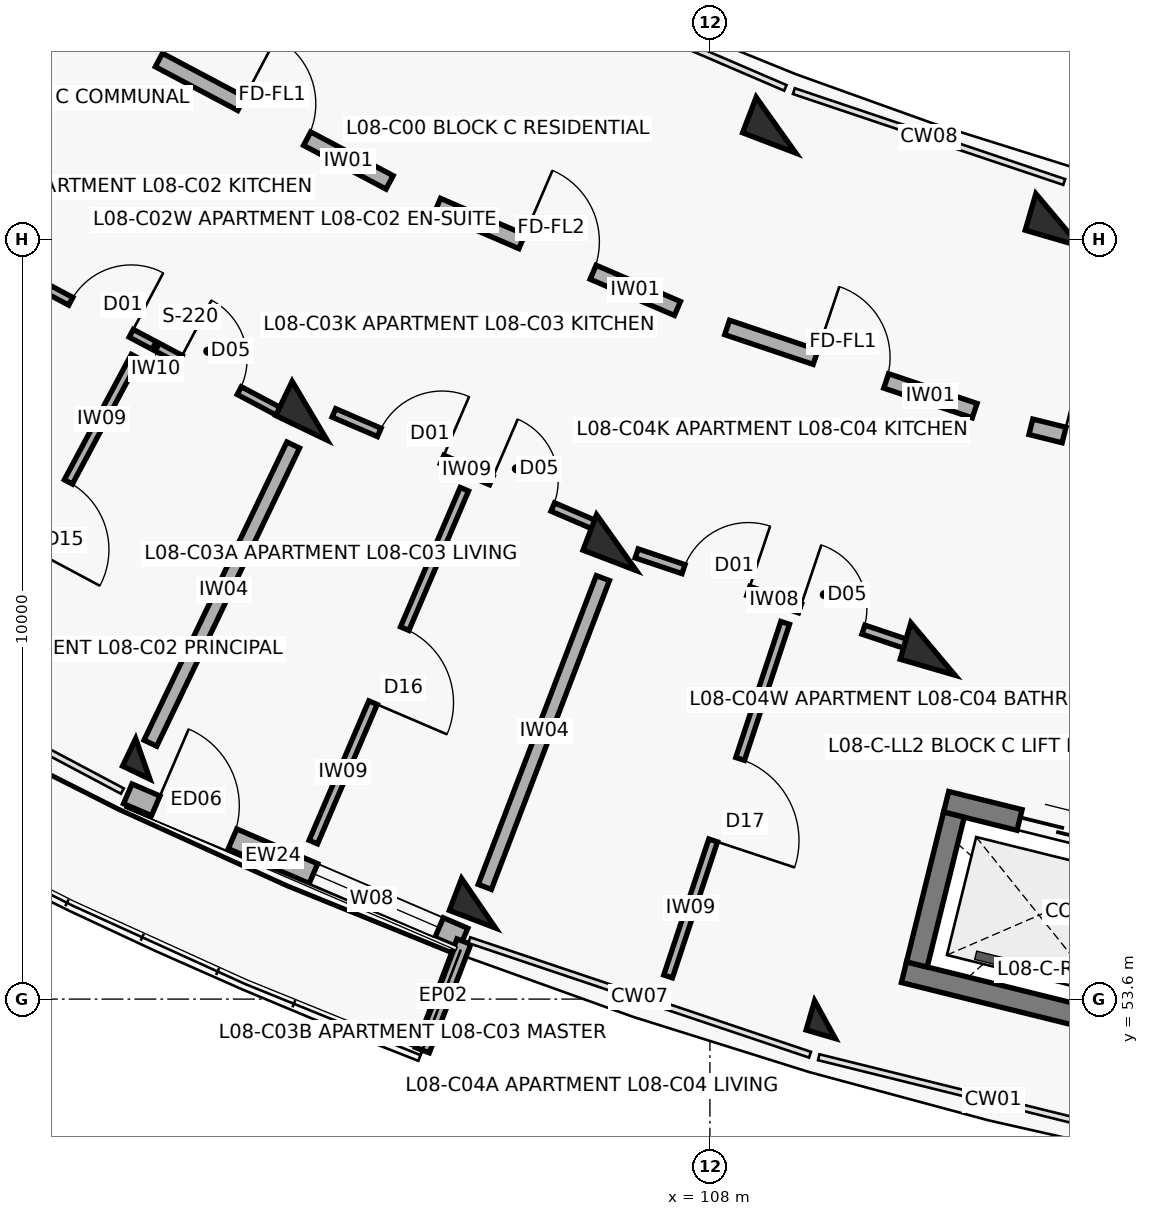
"""IFC4 building model, lengths in metres.
Left out: names, types, materials, properties, quantities, classifications, styles, units other than length and angle.
Written with IfcOpenShell. Run it as: python <this file> out.ifc"""

import sys

from ifc_helpers import new_model, si_unit, direction, frame, frame_2d, origin, origin_2d, place, context, subcontext, project, spatial, rectangle, extrude, element, fill, save


model = new_model("IFC4")
c1 = context("Model", 3, precision=1e-05, world=origin(), true_north=direction((0.0, 1.0)))
c2 = subcontext(c1, "Body", "Model", "MODEL_VIEW")
j1 = project(units=[si_unit("LENGTHUNIT", "METRE"), si_unit("PLANEANGLEUNIT", "RADIAN")], contexts=[c1])
p1 = place(None, origin())
s1 = spatial("IfcSite", under=j1, at=p1, CompositionType="ELEMENT")
p2 = place(p1, origin())
s2 = spatial("IfcBuilding", under=s1, at=p2, CompositionType="ELEMENT")
p3 = place(p2, frame((0.0, 0.0, 26.7)))
s3 = spatial("IfcBuildingStorey", under=s2, at=p3, CompositionType="ELEMENT", Elevation=26.7)
p4 = place(p3, frame((102.734, 61.341, 0.0), z_axis=(0.0, 0.0, 1.0), x_axis=(-0.432085748802, -0.901832526405, 0.0)))
e1 = element("IfcColumn", 1, at=p4, inside=s3, PredefinedType="COLUMN", context=c2, shape_type="SweptSolid", body=[
    extrude(rectangle(XDim=0.5, YDim=0.75, at=origin_2d()), origin(), (0.0, 0.0, 1.0), 3.1),
])
p5 = place(p3, frame((100.539, 56.76, 0.0), z_axis=(0.0, 0.0, 1.0), x_axis=(-0.432085748802, -0.901832526405, 0.0)))
e2 = element("IfcColumn", 2, at=p5, inside=s3, PredefinedType="COLUMN", context=c2, shape_type="SweptSolid", body=[
    extrude(rectangle(XDim=0.4, YDim=0.4, at=origin_2d()), origin(), (0.0, 0.0, 1.0), 3.1),
])
for number, where, z_axis, x_axis in (
    (3, (108.869, 65.099, 0.0), (0.0, 0.0, 1.0), (-0.357, -0.934, 0.0)),
    (4, (106.77, 59.606, 0.0), (0.0, 0.0, 1.0), (-0.357, -0.934, 0.0)),
):
    element("IfcColumn", number, at=place(p3, frame(where, z_axis=z_axis, x_axis=x_axis)), inside=s3, PredefinedType="COLUMN", context=c2, shape_type="SweptSolid", body=[
        extrude(rectangle(XDim=0.5, YDim=0.75, at=origin_2d()), origin(), (0.0, 0.0, 1.0), 3.1),
    ])
p6 = place(p3, frame((104.956, 54.861, 0.0), z_axis=(0.0, 0.0, 1.0), x_axis=(-0.357064076459, -0.934079892355, 0.0)))
e5 = element("IfcColumn", 5, at=p6, inside=s3, PredefinedType="COLUMN", context=c2, shape_type="SweptSolid", body=[
    extrude(rectangle(XDim=0.45, YDim=0.65, at=origin_2d()), origin(), (0.0, 0.0, 1.0), 3.1),
])
for number, where, z_axis, x_axis in (
    (6, (112.579, 63.852, 0.0), (0.0, 0.0, 1.0), (-0.28, -0.96, 0.0)),
    (7, (110.934, 58.207, 0.0), (0.0, 0.0, 1.0), (-0.28, -0.96, 0.0)),
):
    element("IfcColumn", number, at=place(p3, frame(where, z_axis=z_axis, x_axis=x_axis)), inside=s3, PredefinedType="COLUMN", context=c2, shape_type="SweptSolid", body=[
        extrude(rectangle(XDim=0.5, YDim=0.75, at=origin_2d()), origin(), (0.0, 0.0, 1.0), 3.1),
    ])
p7 = place(p3, frame((109.513, 53.329, 0.0), z_axis=(0.0, 0.0, 1.0), x_axis=(-0.27966144946, -0.96009867914, 0.0)))
e8 = element("IfcColumn", 8, at=p7, inside=s3, PredefinedType="COLUMN", context=c2, shape_type="SweptSolid", body=[
    extrude(rectangle(XDim=0.4, YDim=0.4, at=origin_2d()), origin(), (0.0, 0.0, 1.0), 3.1),
])
p8 = place(p3, frame((100.341, 56.301, 0.0), z_axis=(0.0, 0.0, 1.0), x_axis=(0.918737524932, -0.39486878869, 0.0)))
e9 = element("IfcWall", 9, at=p8, inside=s3, PredefinedType="SOLIDWALL", context=c2, shape_type="SweptSolid", body=[
    extrude(rectangle(XDim=4.809, YDim=0.282, at=frame_2d((2.405, 0.0))), origin(), (0.0, 0.0, 1.0), 2.25),
])
p9 = place(p8, frame((0.4, 0.0, 0.0)))
e10 = element("IfcOpeningElement", 10, at=p9, cuts=e9, PredefinedType="OPENING", context=c2, shape_type="SweptSolid", body=[
    extrude(rectangle(XDim=1.1, YDim=2.15, at=frame_2d((0.55, 1.075))), frame((0.0, 0.151, 0.0), z_axis=(0.0, -1.0, 0.0), x_axis=(1.0, 0.0, 0.0)), (0.0, 0.0, 1.0), 0.302),
])
p10 = place(p8, frame((2.659, 0.0, 0.35)))
e11 = element("IfcOpeningElement", 11, at=p10, cuts=e9, PredefinedType="OPENING", context=c2, shape_type="SweptSolid", body=[
    extrude(rectangle(XDim=1.8, YDim=1.65, at=frame_2d((0.9, 0.825))), frame((0.0, 0.151, 0.0), z_axis=(0.0, -1.0, 0.0), x_axis=(1.0, 0.0, 0.0)), (0.0, 0.0, 1.0), 0.302),
])
p11 = place(p3, frame((104.763, 54.357, 0.0), z_axis=(0.0, 0.0, 1.0), x_axis=(-0.356957296461, -0.934120703391, 0.0)))
e12 = element("IfcWall", 12, at=p11, inside=s3, PredefinedType="PARAPET", context=c2, shape_type="SweptSolid", body=[
    extrude(rectangle(XDim=1.53, YDim=0.195, at=frame_2d((0.765, 0.0))), origin(), (0.0, 0.0, 1.0), 2.25),
])
p12 = place(p3, frame((111.108, 56.196, 0.0), z_axis=(0.0, 0.0, 1.0), x_axis=(0.970706856107, -0.240266933861, 0.0)))
e13 = element("IfcWall", 13, at=p12, inside=s3, PredefinedType="SHEAR", context=c2, shape_type="SweptSolid", body=[
    extrude(rectangle(XDim=3.09, YDim=0.28, at=frame_2d((1.545, 0.0))), origin(), (0.0, 0.0, 1.0), 3.1),
])
p13 = place(p12, frame((0.995, 0.0, 0.0)))
e14 = element("IfcOpeningElement", 14, at=p13, cuts=e13, PredefinedType="OPENING", context=c2, shape_type="SweptSolid", body=[
    extrude(rectangle(XDim=1.1, YDim=2.15, at=frame_2d((0.55, 1.075))), frame((0.0, 0.15, 0.0), z_axis=(0.0, -1.0, 0.0), x_axis=(1.0, 0.0, 0.0)), (0.0, 0.0, 1.0), 0.3),
])
p14 = place(p3, frame((110.553, 53.954, 0.0), z_axis=(0.0, 0.0, 1.0), x_axis=(0.970725280816, -0.240192483614, 0.0)))
e15 = element("IfcWall", 15, at=p14, inside=s3, PredefinedType="SHEAR", context=c2, shape_type="SweptSolid", body=[
    extrude(rectangle(XDim=3.09, YDim=0.28, at=frame_2d((1.545, 0.0))), origin(), (0.0, 0.0, 1.0), 3.1),
])
p15 = place(p3, frame((111.21, 56.027, 0.0), z_axis=(0.0, 0.0, 1.0), x_axis=(-0.240186044774, -0.970726873995, 0.0)))
e16 = element("IfcWall", 16, at=p15, inside=s3, PredefinedType="SHEAR", context=c2, shape_type="SweptSolid", body=[
    extrude(rectangle(XDim=2.03, YDim=0.28, at=frame_2d((1.015, 0.0))), origin(), (0.0, 0.0, 1.0), 3.1),
])
p16 = place(p3, frame((100.75, 65.956, 0.0), z_axis=(0.0, 0.0, 1.0), x_axis=(0.883440266101, -0.468543803963, 0.0)))
e17 = element("IfcWall", 17, at=p16, inside=s3, PredefinedType="SOLIDWALL", context=c2, shape_type="SweptSolid", body=[
    extrude(rectangle(XDim=3.436, YDim=0.2, at=frame_2d((1.718, 0.0))), origin(), (0.0, 0.0, 1.0), 2.08),
])
p17 = place(p16, frame((1.228, 0.0, 0.0)))
e18 = element("IfcOpeningElement", 18, at=p17, cuts=e17, PredefinedType="OPENING", context=c2, shape_type="SweptSolid", body=[
    extrude(rectangle(XDim=0.98, YDim=2.15, at=frame_2d((0.49, 1.075))), frame((0.0, 0.11, 0.0), z_axis=(0.0, -1.0, 0.0), x_axis=(1.0, 0.0, 0.0)), (0.0, 0.0, 1.0), 0.22),
])
p18 = place(p3, frame((99.017, 63.087, 0.0), z_axis=(0.0, 0.0, 1.0), x_axis=(0.883415075746, -0.468591297342, 0.0)))
e19 = element("IfcWall", 19, at=p18, inside=s3, PredefinedType="PARTITIONING", context=c2, shape_type="SweptSolid", body=[
    extrude(rectangle(XDim=3.81, YDim=0.115, at=frame_2d((1.905, 0.0))), origin(), (0.0, 0.0, 1.0), 2.08),
])
p19 = place(p18, frame((0.65, 0.0, 0.0)))
e20 = element("IfcOpeningElement", 20, at=p19, cuts=e19, PredefinedType="OPENING", context=c2, shape_type="SweptSolid", body=[
    extrude(rectangle(XDim=0.9, YDim=2.1, at=frame_2d((0.45, 1.05))), frame((0.0, 0.067, 0.0), z_axis=(0.0, -1.0, 0.0), x_axis=(1.0, 0.0, 0.0)), (0.0, 0.0, 1.0), 0.135),
])
p20 = place(p18, frame((2.28, 0.0, 0.0)))
e21 = element("IfcOpeningElement", 21, at=p20, cuts=e19, PredefinedType="OPENING", context=c2, shape_type="SweptSolid", body=[
    extrude(rectangle(XDim=0.88, YDim=2.1, at=frame_2d((0.44, 1.05))), frame((0.0, 0.067, 0.0), z_axis=(0.0, -1.0, 0.0), x_axis=(1.0, 0.0, 0.0)), (0.0, 0.0, 1.0), 0.135),
])
p21 = place(p3, frame((100.44, 62.054, 0.0), z_axis=(0.0, 0.0, 1.0), x_axis=(-0.471207016772, -0.882022645596, 0.0)))
e22 = element("IfcWall", 22, at=p21, inside=s3, PredefinedType="PARTITIONING", context=c2, shape_type="SweptSolid", body=[
    extrude(rectangle(XDim=4.75, YDim=0.12, at=frame_2d((2.375, 0.0))), origin(), (0.0, 0.0, 1.0), 2.08),
])
p22 = place(p21, frame((1.87, 0.0, 0.0)))
e23 = element("IfcOpeningElement", 23, at=p22, cuts=e22, PredefinedType="OPENING", context=c2, shape_type="SweptSolid", body=[
    extrude(rectangle(XDim=1.01, YDim=2.1, at=frame_2d((0.505, 1.05))), frame((0.0, 0.07, 0.0), z_axis=(0.0, -1.0, 0.0), x_axis=(1.0, 0.0, 0.0)), (0.0, 0.0, 1.0), 0.14),
])
p23 = place(p3, frame((104.417, 64.044, 0.0), z_axis=(0.0, 0.0, 1.0), x_axis=(0.918718172399, -0.394913813008, 0.0)))
e24 = element("IfcWall", 24, at=p23, inside=s3, PredefinedType="SOLIDWALL", context=c2, shape_type="SweptSolid", body=[
    extrude(rectangle(XDim=3.436, YDim=0.2, at=frame_2d((1.718, 0.0))), origin(), (0.0, 0.0, 1.0), 2.08),
])
p24 = place(p23, frame((1.208, 0.0, 0.0)))
e25 = element("IfcOpeningElement", 25, at=p24, cuts=e24, PredefinedType="OPENING", context=c2, shape_type="SweptSolid", body=[
    extrude(rectangle(XDim=1.02, YDim=2.15, at=frame_2d((0.51, 1.075))), frame((0.0, 0.11, 0.0), z_axis=(0.0, -1.0, 0.0), x_axis=(1.0, 0.0, 0.0)), (0.0, 0.0, 1.0), 0.22),
])
p25 = place(p3, frame((103.052, 61.313, 0.0), z_axis=(0.0, 0.0, 1.0), x_axis=(0.918714121981, -0.39492323567, 0.0)))
e26 = element("IfcWall", 26, at=p25, inside=s3, PredefinedType="PARTITIONING", context=c2, shape_type="SweptSolid", body=[
    extrude(rectangle(XDim=3.785, YDim=0.12, at=frame_2d((1.893, 0.0))), origin(), (0.0, 0.0, 1.0), 2.08),
])
p26 = place(p25, frame((0.65, 0.0, 0.0)))
e27 = element("IfcOpeningElement", 27, at=p26, cuts=e26, PredefinedType="OPENING", context=c2, shape_type="SweptSolid", body=[
    extrude(rectangle(XDim=0.9, YDim=2.1, at=frame_2d((0.45, 1.05))), frame((0.0, 0.07, 0.0), z_axis=(0.0, -1.0, 0.0), x_axis=(1.0, 0.0, 0.0)), (0.0, 0.0, 1.0), 0.14),
])
p27 = place(p25, frame((2.255, 0.0, 0.0)))
e28 = element("IfcOpeningElement", 28, at=p27, cuts=e26, PredefinedType="OPENING", context=c2, shape_type="SweptSolid", body=[
    extrude(rectangle(XDim=0.88, YDim=2.1, at=frame_2d((0.44, 1.05))), frame((0.0, 0.07, 0.0), z_axis=(0.0, -1.0, 0.0), x_axis=(1.0, 0.0, 0.0)), (0.0, 0.0, 1.0), 0.14),
])
p28 = place(p3, frame((104.769, 60.309, 0.0), z_axis=(0.0, 0.0, 1.0), x_axis=(-0.393522505308, -0.919314982917, 0.0)))
e29 = element("IfcWall", 29, at=p28, inside=s3, PredefinedType="PARTITIONING", context=c2, shape_type="SweptSolid", body=[
    extrude(rectangle(XDim=5.05, YDim=0.12, at=frame_2d((2.525, 0.0))), origin(), (0.0, 0.0, 1.0), 2.08),
])
p29 = place(p28, frame((1.995, 0.0, 0.0)))
e30 = element("IfcOpeningElement", 30, at=p29, cuts=e29, PredefinedType="OPENING", context=c2, shape_type="SweptSolid", body=[
    extrude(rectangle(XDim=1.06, YDim=2.1, at=frame_2d((0.53, 1.05))), frame((0.0, 0.07, 0.0), z_axis=(0.0, -1.0, 0.0), x_axis=(1.0, 0.0, 0.0)), (0.0, 0.0, 1.0), 0.14),
])
p30 = place(p3, frame((102.518, 60.89, 0.0), z_axis=(0.0, 0.0, 1.0), x_axis=(-0.432108769108, -0.901821496561, 0.0)))
e31 = element("IfcWall", 31, at=p30, inside=s3, PredefinedType="SOLIDWALL", context=c2, shape_type="SweptSolid", body=[
    extrude(rectangle(XDim=4.35, YDim=0.185, at=frame_2d((2.175, 0.0))), origin(), (0.0, 0.0, 1.0), 2.08),
])
p31 = place(p3, frame((108.227, 62.437, 0.0), z_axis=(0.0, 0.0, 1.0), x_axis=(0.947884468821, -0.318614239745, 0.0)))
e32 = element("IfcWall", 32, at=p31, inside=s3, PredefinedType="SOLIDWALL", context=c2, shape_type="SweptSolid", body=[
    extrude(rectangle(XDim=3.436, YDim=0.2, at=frame_2d((1.718, 0.0))), origin(), (0.0, 0.0, 1.0), 2.08),
])
p32 = place(p31, frame((1.228, 0.0, 0.0)))
e33 = element("IfcOpeningElement", 33, at=p32, cuts=e32, PredefinedType="OPENING", context=c2, shape_type="SweptSolid", body=[
    extrude(rectangle(XDim=0.98, YDim=2.15, at=frame_2d((0.49, 1.075))), frame((0.0, 0.11, 0.0), z_axis=(0.0, -1.0, 0.0), x_axis=(1.0, 0.0, 0.0)), (0.0, 0.0, 1.0), 0.22),
])
p33 = place(p3, frame((107.036, 59.464, 0.0), z_axis=(0.0, 0.0, 1.0), x_axis=(0.947883094845, -0.318618327323, 0.0)))
e34 = element("IfcWall", 34, at=p33, inside=s3, PredefinedType="PARTITIONING", context=c2, shape_type="SweptSolid", body=[
    extrude(rectangle(XDim=3.798, YDim=0.125, at=frame_2d((1.899, 0.0))), origin(), (0.0, 0.0, 1.0), 2.08),
])
p34 = place(p33, frame((0.65, 0.0, 0.0)))
e35 = element("IfcOpeningElement", 35, at=p34, cuts=e34, PredefinedType="OPENING", context=c2, shape_type="SweptSolid", body=[
    extrude(rectangle(XDim=0.9, YDim=2.1, at=frame_2d((0.45, 1.05))), frame((0.0, 0.073, 0.0), z_axis=(0.0, -1.0, 0.0), x_axis=(1.0, 0.0, 0.0)), (0.0, 0.0, 1.0), 0.145),
])
p35 = place(p33, frame((2.267, 0.0, 0.0)))
e36 = element("IfcOpeningElement", 36, at=p35, cuts=e34, PredefinedType="OPENING", context=c2, shape_type="SweptSolid", body=[
    extrude(rectangle(XDim=0.88, YDim=2.1, at=frame_2d((0.44, 1.05))), frame((0.0, 0.073, 0.0), z_axis=(0.0, -1.0, 0.0), x_axis=(1.0, 0.0, 0.0)), (0.0, 0.0, 1.0), 0.145),
])
p36 = place(p3, frame((108.99, 58.55, 0.0), z_axis=(0.0, 0.0, 1.0), x_axis=(-0.314343770763, -0.949309219266, 0.0)))
e37 = element("IfcWall", 37, at=p36, inside=s3, PredefinedType="PARTITIONING", context=c2, shape_type="SweptSolid", body=[
    extrude(rectangle(XDim=4.9, YDim=0.12, at=frame_2d((2.45, 0.0))), origin(), (0.0, 0.0, 1.0), 2.08),
])
p37 = place(p36, frame((1.885, 0.0, 0.0)))
e38 = element("IfcOpeningElement", 38, at=p37, cuts=e37, PredefinedType="OPENING", context=c2, shape_type="SweptSolid", body=[
    extrude(rectangle(XDim=1.13, YDim=2.1, at=frame_2d((0.565, 1.05))), frame((0.0, 0.07, 0.0), z_axis=(0.0, -1.0, 0.0), x_axis=(1.0, 0.0, 0.0)), (0.0, 0.0, 1.0), 0.14),
])
p38 = place(p3, frame((106.591, 59.139, 0.0), z_axis=(0.0, 0.0, 1.0), x_axis=(-0.357064016205, -0.934079915388, 0.0)))
e39 = element("IfcWall", 39, at=p38, inside=s3, PredefinedType="SOLIDWALL", context=c2, shape_type="SweptSolid", body=[
    extrude(rectangle(XDim=4.35, YDim=0.185, at=frame_2d((2.175, 0.0))), origin(), (0.0, 0.0, 1.0), 2.08),
])
p39 = place(p3, frame((112.223, 61.13, 0.0), z_axis=(0.0, 0.0, 1.0), x_axis=(0.970719238682, -0.240216901263, 0.0)))
e40 = element("IfcWall", 40, at=p39, inside=s3, PredefinedType="SOLIDWALL", context=c2, shape_type="SweptSolid", body=[
    extrude(rectangle(XDim=3.296, YDim=0.21, at=frame_2d((1.648, 0.0))), origin(), (0.0, 0.0, 1.0), 2.08),
])
p40 = place(p39, frame((0.45, 0.0, 0.0)))
e41 = element("IfcOpeningElement", 41, at=p40, cuts=e40, PredefinedType="OPENING", context=c2, shape_type="SweptSolid", body=[
    extrude(rectangle(XDim=1.1, YDim=2.15, at=frame_2d((0.55, 1.075))), frame((0.0, 0.115, 0.0), z_axis=(0.0, -1.0, 0.0), x_axis=(1.0, 0.0, 0.0)), (0.0, 0.0, 1.0), 0.23),
])
p41 = place(p39, frame((1.726, 0.0, 0.0)))
e42 = element("IfcOpeningElement", 42, at=p41, cuts=e40, PredefinedType="OPENING", context=c2, shape_type="SweptSolid", body=[
    extrude(rectangle(XDim=1.12, YDim=2.15, at=frame_2d((0.56, 1.075))), frame((0.0, 0.115, 0.0), z_axis=(0.0, -1.0, 0.0), x_axis=(1.0, 0.0, 0.0)), (0.0, 0.0, 1.0), 0.23),
])
p42 = place(p9, origin())
e43 = element("IfcDoor", 43, at=p42, inside=s3, OperationType="SINGLE_SWING_LEFT", PredefinedType="DOOR", context=c2, shape_type="SweptSolid", body=[
    extrude(rectangle(XDim=1.1, YDim=2.15, at=frame_2d((0.55, 1.075))), frame((0.0, 0.025, 0.0), z_axis=(0.0, -1.0, 0.0), x_axis=(1.0, 0.0, 0.0)), (0.0, 0.0, 1.0), 0.05),
])
fill(e10, e43)
p43 = place(p10, origin())
e44 = element("IfcWindow", 44, at=p43, inside=s3, PartitioningType="TRIPLE_PANEL_VERTICAL", PredefinedType="WINDOW", context=c2, shape_type="SweptSolid", body=[
    extrude(rectangle(XDim=1.8, YDim=1.65, at=frame_2d((0.9, 0.825))), frame((0.0, 0.03, 0.0), z_axis=(0.0, -1.0, 0.0), x_axis=(1.0, 0.0, 0.0)), (0.0, 0.0, 1.0), 0.06),
])
fill(e11, e44)
p44 = place(p13, origin())
e45 = element("IfcDoor", 45, at=p44, inside=s3, OperationType="DOUBLE_DOOR_SLIDING", PredefinedType="DOOR", context=c2, shape_type="SweptSolid", body=[
    extrude(rectangle(XDim=1.1, YDim=2.15, at=frame_2d((0.55, 1.075))), frame((0.0, 0.025, 0.0), z_axis=(0.0, -1.0, 0.0), x_axis=(1.0, 0.0, 0.0)), (0.0, 0.0, 1.0), 0.05),
])
fill(e14, e45)
p45 = place(p17, origin())
e46 = element("IfcDoor", 46, at=p45, inside=s3, OperationType="SINGLE_SWING_LEFT", PredefinedType="DOOR", context=c2, shape_type="SweptSolid", body=[
    extrude(rectangle(XDim=0.98, YDim=2.15, at=frame_2d((0.49, 1.075))), frame((0.0, 0.025, 0.0), z_axis=(0.0, -1.0, 0.0), x_axis=(1.0, 0.0, 0.0)), (0.0, 0.0, 1.0), 0.05),
])
fill(e18, e46)
p46 = place(p19, origin())
e47 = element("IfcDoor", 47, at=p46, inside=s3, OperationType="SINGLE_SWING_RIGHT", PredefinedType="DOOR", context=c2, shape_type="SweptSolid", body=[
    extrude(rectangle(XDim=0.9, YDim=2.1, at=frame_2d((0.45, 1.05))), frame((0.0, 0.025, 0.0), z_axis=(0.0, -1.0, 0.0), x_axis=(1.0, 0.0, 0.0)), (0.0, 0.0, 1.0), 0.05),
])
fill(e20, e47)
p47 = place(p20, origin())
e48 = element("IfcDoor", 48, at=p47, inside=s3, OperationType="SINGLE_SWING_LEFT", PredefinedType="DOOR", context=c2, shape_type="SweptSolid", body=[
    extrude(rectangle(XDim=0.88, YDim=2.1, at=frame_2d((0.44, 1.05))), frame((0.0, 0.025, 0.0), z_axis=(0.0, -1.0, 0.0), x_axis=(1.0, 0.0, 0.0)), (0.0, 0.0, 1.0), 0.05),
])
fill(e21, e48)
p48 = place(p22, origin())
e49 = element("IfcDoor", 49, at=p48, inside=s3, OperationType="SINGLE_SWING_RIGHT", PredefinedType="DOOR", context=c2, shape_type="SweptSolid", body=[
    extrude(rectangle(XDim=1.01, YDim=2.1, at=frame_2d((0.505, 1.05))), frame((0.0, 0.025, 0.0), z_axis=(0.0, -1.0, 0.0), x_axis=(1.0, 0.0, 0.0)), (0.0, 0.0, 1.0), 0.05),
])
fill(e23, e49)
p49 = place(p24, origin())
e50 = element("IfcDoor", 50, at=p49, inside=s3, OperationType="SINGLE_SWING_LEFT", PredefinedType="DOOR", context=c2, shape_type="SweptSolid", body=[
    extrude(rectangle(XDim=1.02, YDim=2.15, at=frame_2d((0.51, 1.075))), frame((0.0, 0.025, 0.0), z_axis=(0.0, -1.0, 0.0), x_axis=(1.0, 0.0, 0.0)), (0.0, 0.0, 1.0), 0.05),
])
fill(e25, e50)
p50 = place(p26, origin())
e51 = element("IfcDoor", 51, at=p50, inside=s3, OperationType="SINGLE_SWING_RIGHT", PredefinedType="DOOR", context=c2, shape_type="SweptSolid", body=[
    extrude(rectangle(XDim=0.9, YDim=2.1, at=frame_2d((0.45, 1.05))), frame((0.0, 0.025, 0.0), z_axis=(0.0, -1.0, 0.0), x_axis=(1.0, 0.0, 0.0)), (0.0, 0.0, 1.0), 0.05),
])
fill(e27, e51)
p51 = place(p27, origin())
e52 = element("IfcDoor", 52, at=p51, inside=s3, OperationType="SINGLE_SWING_LEFT", PredefinedType="DOOR", context=c2, shape_type="SweptSolid", body=[
    extrude(rectangle(XDim=0.88, YDim=2.1, at=frame_2d((0.44, 1.05))), frame((0.0, 0.025, 0.0), z_axis=(0.0, -1.0, 0.0), x_axis=(1.0, 0.0, 0.0)), (0.0, 0.0, 1.0), 0.05),
])
fill(e28, e52)
p52 = place(p29, origin())
e53 = element("IfcDoor", 53, at=p52, inside=s3, OperationType="SINGLE_SWING_RIGHT", PredefinedType="DOOR", context=c2, shape_type="SweptSolid", body=[
    extrude(rectangle(XDim=1.06, YDim=2.1, at=frame_2d((0.53, 1.05))), frame((0.0, 0.025, 0.0), z_axis=(0.0, -1.0, 0.0), x_axis=(1.0, 0.0, 0.0)), (0.0, 0.0, 1.0), 0.05),
])
fill(e30, e53)
p53 = place(p32, origin())
e54 = element("IfcDoor", 54, at=p53, inside=s3, OperationType="SINGLE_SWING_LEFT", PredefinedType="DOOR", context=c2, shape_type="SweptSolid", body=[
    extrude(rectangle(XDim=0.98, YDim=2.15, at=frame_2d((0.49, 1.075))), frame((0.0, 0.025, 0.0), z_axis=(0.0, -1.0, 0.0), x_axis=(1.0, 0.0, 0.0)), (0.0, 0.0, 1.0), 0.05),
])
fill(e33, e54)
p54 = place(p34, origin())
e55 = element("IfcDoor", 55, at=p54, inside=s3, OperationType="SINGLE_SWING_RIGHT", PredefinedType="DOOR", context=c2, shape_type="SweptSolid", body=[
    extrude(rectangle(XDim=0.9, YDim=2.1, at=frame_2d((0.45, 1.05))), frame((0.0, 0.025, 0.0), z_axis=(0.0, -1.0, 0.0), x_axis=(1.0, 0.0, 0.0)), (0.0, 0.0, 1.0), 0.05),
])
fill(e35, e55)
p55 = place(p35, origin())
e56 = element("IfcDoor", 56, at=p55, inside=s3, OperationType="SINGLE_SWING_LEFT", PredefinedType="DOOR", context=c2, shape_type="SweptSolid", body=[
    extrude(rectangle(XDim=0.88, YDim=2.1, at=frame_2d((0.44, 1.05))), frame((0.0, 0.025, 0.0), z_axis=(0.0, -1.0, 0.0), x_axis=(1.0, 0.0, 0.0)), (0.0, 0.0, 1.0), 0.05),
])
fill(e36, e56)
p56 = place(p37, origin())
e57 = element("IfcDoor", 57, at=p56, inside=s3, OperationType="SINGLE_SWING_RIGHT", PredefinedType="DOOR", context=c2, shape_type="SweptSolid", body=[
    extrude(rectangle(XDim=1.13, YDim=2.1, at=frame_2d((0.565, 1.05))), frame((0.0, 0.025, 0.0), z_axis=(0.0, -1.0, 0.0), x_axis=(1.0, 0.0, 0.0)), (0.0, 0.0, 1.0), 0.05),
])
fill(e38, e57)
p57 = place(p40, origin())
e58 = element("IfcDoor", 58, at=p57, inside=s3, OperationType="SINGLE_SWING_LEFT", PredefinedType="DOOR", context=c2, shape_type="SweptSolid", body=[
    extrude(rectangle(XDim=1.1, YDim=2.15, at=frame_2d((0.55, 1.075))), frame((0.0, 0.025, 0.0), z_axis=(0.0, -1.0, 0.0), x_axis=(1.0, 0.0, 0.0)), (0.0, 0.0, 1.0), 0.05),
])
fill(e41, e58)
save(model, sys.argv[1])
